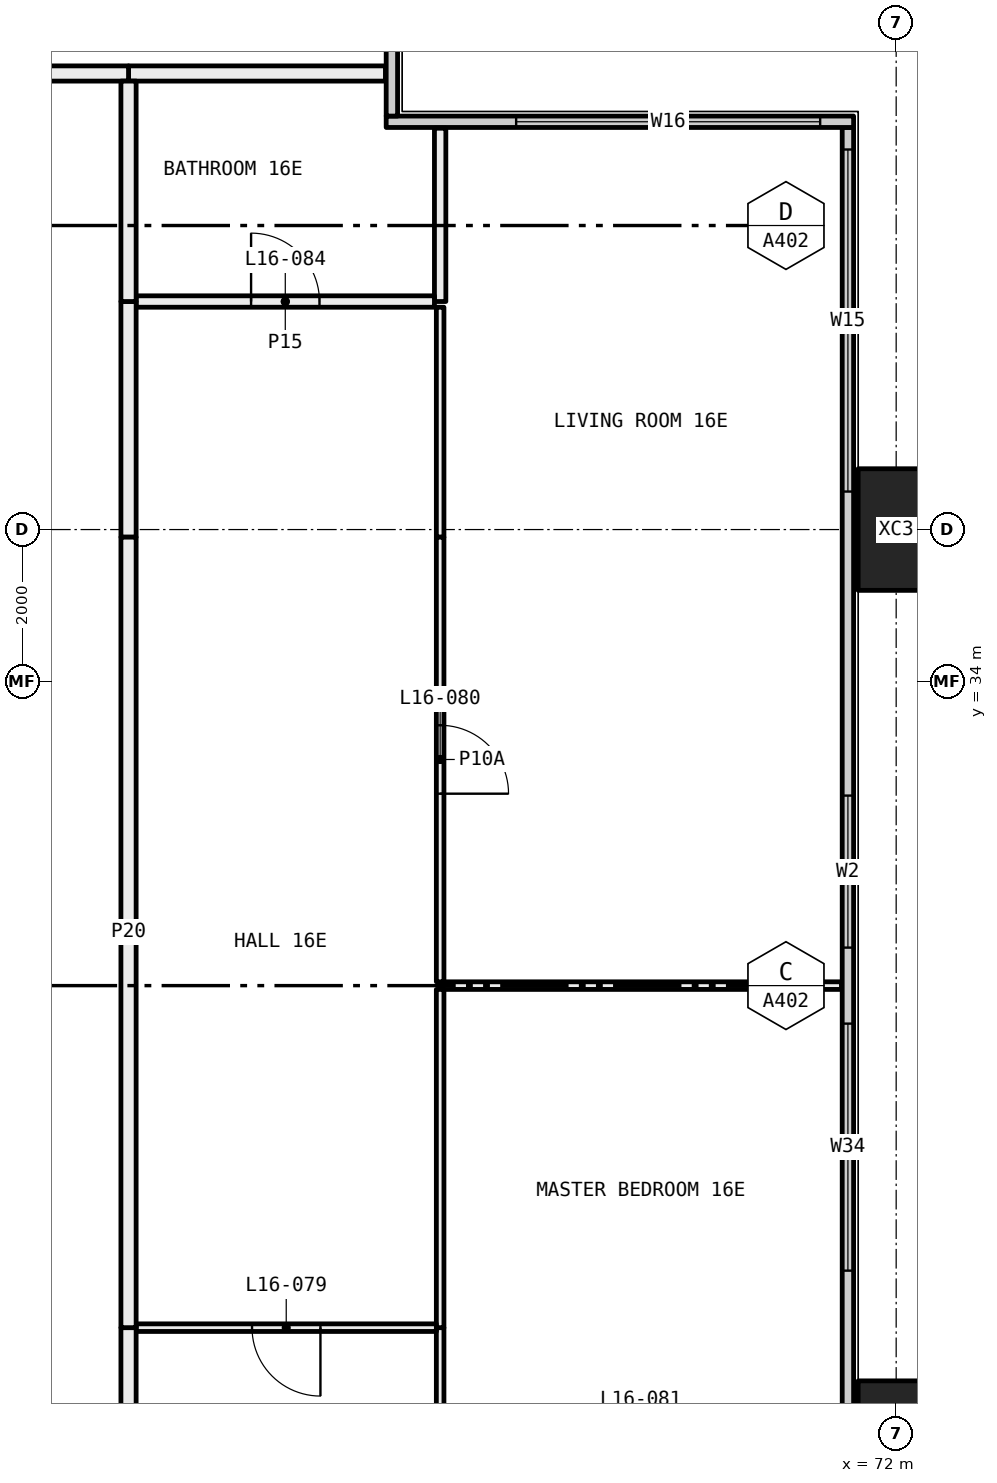
"""IFC4 building model, lengths in metres.
Left out: names, types, materials, properties, quantities, classifications, styles, units other than length and angle.
Written with IfcOpenShell. Run it as: python <this file> out.ifc"""

import sys

from ifc_helpers import new_model, si_unit, direction, frame, frame_2d, origin, origin_2d, place, context, subcontext, project, spatial, rectangle, hollow_rectangle, extrude, element, fill, save


model = new_model("IFC4")
c1 = context("Model", 3, precision=1e-05, world=origin(), true_north=direction((0.0, 1.0)))
c2 = subcontext(c1, "Body", "Model", "MODEL_VIEW")
j1 = project(units=[si_unit("LENGTHUNIT", "METRE"), si_unit("PLANEANGLEUNIT", "RADIAN")], contexts=[c1])
p1 = place(None, origin())
s1 = spatial("IfcSite", under=j1, at=p1, CompositionType="ELEMENT")
p2 = place(p1, origin())
s2 = spatial("IfcBuilding", under=s1, at=p2, CompositionType="ELEMENT")
p3 = place(p2, frame((0.0, 0.0, 67.95)))
s3 = spatial("IfcBuildingStorey", under=s2, at=p3, CompositionType="ELEMENT", Elevation=67.95)
for number, where, z_axis, x_axis in (
    (1, (72.0, 24.0, -0.4), (0.0, 0.0, 1.0), (0.0, 1.0, 0.0)),
    (2, (72.0, 36.0, -0.4), (0.0, 0.0, 1.0), (0.0, 1.0, 0.0)),
):
    element("IfcColumn", number, at=place(p3, frame(where, z_axis=z_axis, x_axis=x_axis)), inside=s3, PredefinedType="COLUMN", context=c2, shape_type="SweptSolid", body=[
        extrude(hollow_rectangle(XDim=1.6, YDim=1.0, WallThickness=0.065, at=origin_2d()), origin(), (0.0, 0.0, 1.0), 3.45),
    ])
p4 = place(p3, frame((71.365, 6.71, 0.0), z_axis=(0.0, 0.0, 1.0), x_axis=(0.0, 1.0, 0.0)))
e3 = element("IfcWall", 3, at=p4, inside=s3, PredefinedType="ELEMENTEDWALL", context=c2, shape_type="SweptSolid", body=[
    extrude(rectangle(XDim=34.58, YDim=0.15, at=frame_2d((17.29, 0.0))), origin(), (0.0, 0.0, 1.0), 3.05),
])
p5 = place(p4, frame((0.29, 0.0, 0.45)))
e4 = element("IfcOpeningElement", 4, at=p5, cuts=e3, PredefinedType="OPENING", context=c2, shape_type="SweptSolid", body=[
    extrude(rectangle(XDim=4.5, YDim=2.55, at=frame_2d((2.25, 1.275))), frame((0.0, 0.085, 0.0), z_axis=(0.0, -1.0, 0.0), x_axis=(1.0, 0.0, 0.0)), (0.0, 0.0, 1.0), 0.17),
])
p6 = place(p4, frame((7.54, 0.0, 0.45)))
e5 = element("IfcOpeningElement", 5, at=p6, cuts=e3, PredefinedType="OPENING", context=c2, shape_type="SweptSolid", body=[
    extrude(rectangle(XDim=3.25, YDim=2.55, at=frame_2d((1.625, 1.275))), frame((0.0, 0.085, 0.0), z_axis=(0.0, -1.0, 0.0), x_axis=(1.0, 0.0, 0.0)), (0.0, 0.0, 1.0), 0.17),
])
p7 = place(p4, frame((11.79, 0.0, 0.45)))
e6 = element("IfcOpeningElement", 6, at=p7, cuts=e3, PredefinedType="OPENING", context=c2, shape_type="SweptSolid", body=[
    extrude(rectangle(XDim=3.25, YDim=2.55, at=frame_2d((1.625, 1.275))), frame((0.0, 0.085, 0.0), z_axis=(0.0, -1.0, 0.0), x_axis=(1.0, 0.0, 0.0)), (0.0, 0.0, 1.0), 0.17),
])
p8 = place(p4, frame((19.54, 0.0, 0.45)))
e7 = element("IfcOpeningElement", 7, at=p8, cuts=e3, PredefinedType="OPENING", context=c2, shape_type="SweptSolid", body=[
    extrude(rectangle(XDim=3.25, YDim=2.55, at=frame_2d((1.625, 1.275))), frame((0.0, 0.085, 0.0), z_axis=(0.0, -1.0, 0.0), x_axis=(1.0, 0.0, 0.0)), (0.0, 0.0, 1.0), 0.17),
])
p9 = place(p4, frame((23.79, 0.0, 0.45)))
e8 = element("IfcOpeningElement", 8, at=p9, cuts=e3, PredefinedType="OPENING", context=c2, shape_type="SweptSolid", body=[
    extrude(rectangle(XDim=2.0, YDim=2.55, at=frame_2d((1.0, 1.275))), frame((0.0, 0.085, 0.0), z_axis=(0.0, -1.0, 0.0), x_axis=(1.0, 0.0, 0.0)), (0.0, 0.0, 1.0), 0.17),
])
p10 = place(p4, frame((29.79, 0.0, 0.45)))
e9 = element("IfcOpeningElement", 9, at=p10, cuts=e3, PredefinedType="OPENING", context=c2, shape_type="SweptSolid", body=[
    extrude(rectangle(XDim=4.5, YDim=2.55, at=frame_2d((2.25, 1.275))), frame((0.0, 0.085, 0.0), z_axis=(0.0, -1.0, 0.0), x_axis=(1.0, 0.0, 0.0)), (0.0, 0.0, 1.0), 0.17),
])
p11 = place(p3, frame((65.29, 41.365, 0.0), z_axis=(0.0, 0.0, 1.0), x_axis=(1.0, 0.0, 0.0)))
e10 = element("IfcWall", 10, at=p11, inside=s3, PredefinedType="ELEMENTEDWALL", context=c2, shape_type="SweptSolid", body=[
    extrude(rectangle(XDim=6.15, YDim=0.15, at=frame_2d((3.075, 0.0))), origin(), (0.0, 0.0, 1.0), 3.05),
])
p12 = place(p11, frame((1.71, 0.0, 0.45)))
e11 = element("IfcOpeningElement", 11, at=p12, cuts=e10, PredefinedType="OPENING", context=c2, shape_type="SweptSolid", body=[
    extrude(rectangle(XDim=4.0, YDim=2.55, at=frame_2d((2.0, 1.275))), frame((0.0, 0.085, 0.0), z_axis=(0.0, -1.0, 0.0), x_axis=(1.0, 0.0, 0.0)), (0.0, 0.0, 1.0), 0.17),
])
p13 = place(p3, frame((65.365, 41.44, 0.0), z_axis=(0.0, 0.0, 1.0), x_axis=(0.0, 1.0, 0.0)))
e12 = element("IfcWall", 12, at=p13, inside=s3, PredefinedType="ELEMENTEDWALL", context=c2, shape_type="SweptSolid", body=[
    extrude(rectangle(XDim=5.85, YDim=0.15, at=frame_2d((2.925, 0.0))), origin(), (0.0, 0.0, 1.0), 3.05),
])
p14 = place(p13, frame((1.56, 0.0, 0.45)))
e13 = element("IfcOpeningElement", 13, at=p14, cuts=e12, PredefinedType="OPENING", context=c2, shape_type="SweptSolid", body=[
    extrude(rectangle(XDim=4.0, YDim=2.55, at=frame_2d((2.0, 1.275))), frame((0.0, 0.085, 0.0), z_axis=(0.0, -1.0, 0.0), x_axis=(1.0, 0.0, 0.0)), (0.0, 0.0, 1.0), 0.17),
])
p15 = place(p3, frame((61.9, 42.0, 0.0), z_axis=(0.0, 0.0, 1.0), x_axis=(1.0, 0.0, 0.0)))
e14 = element("IfcWall", 14, at=p15, inside=s3, PredefinedType="PARTITIONING", context=c2, shape_type="SweptSolid", body=[
    extrude(rectangle(XDim=3.38, YDim=0.2, at=frame_2d((1.69, 0.0))), origin(), (0.0, 0.0, 1.0), 3.05),
])
p16 = place(p3, frame((54.0, 42.0, 0.0), z_axis=(0.0, 0.0, 1.0), x_axis=(1.0, 0.0, 0.0)))
e15 = element("IfcWall", 15, at=p16, inside=s3, PredefinedType="PARTITIONING", context=c2, shape_type="SweptSolid", body=[
    extrude(rectangle(XDim=7.9, YDim=0.2, at=frame_2d((3.95, 0.0))), origin(), (0.0, 0.0, 1.0), 3.05),
])
p17 = place(p3, frame((71.28, 30.0, 0.0), z_axis=(0.0, 0.0, 1.0), x_axis=(-1.0, 0.0, 0.0)))
e16 = element("IfcWall", 16, at=p17, inside=s3, PredefinedType="PARTITIONING", context=c2, shape_type="SweptSolid", body=[
    extrude(rectangle(XDim=5.28, YDim=0.1, at=frame_2d((2.64, 0.0))), origin(), (0.0, 0.0, 1.0), 3.05),
])
p18 = place(p3, frame((66.0, 25.5, 0.0), z_axis=(0.0, 0.0, 1.0), x_axis=(0.0, -1.0, 0.0)))
e17 = element("IfcWall", 17, at=p18, inside=s3, PredefinedType="PARTITIONING", context=c2, shape_type="SweptSolid", body=[
    extrude(rectangle(XDim=1.45, YDim=0.1, at=frame_2d((0.725, 0.0))), origin(), (0.0, 0.0, 1.0), 2.45),
])
p19 = place(p3, frame((66.0, 29.95, 0.0), z_axis=(0.0, 0.0, 1.0), x_axis=(0.0, -1.0, 0.0)))
e18 = element("IfcWall", 18, at=p19, inside=s3, PredefinedType="PARTITIONING", context=c2, shape_type="SweptSolid", body=[
    extrude(rectangle(XDim=4.45, YDim=0.1, at=frame_2d((2.225, 0.0))), origin(), (0.0, 0.0, 1.0), 3.05),
])
p20 = place(p3, frame((66.0, 38.925, 0.0), z_axis=(0.0, 0.0, 1.0), x_axis=(0.0, -1.0, 0.0)))
e19 = element("IfcWall", 19, at=p20, inside=s3, PredefinedType="PARTITIONING", context=c2, shape_type="SweptSolid", body=[
    extrude(rectangle(XDim=3.025, YDim=0.1, at=frame_2d((1.513, 0.0))), origin(), (0.0, 0.0, 1.0), 2.45),
])
p21 = place(p3, frame((66.0, 35.9, 0.0), z_axis=(0.0, 0.0, 1.0), x_axis=(0.0, -1.0, 0.0)))
e20 = element("IfcWall", 20, at=p21, inside=s3, PredefinedType="PARTITIONING", context=c2, shape_type="SweptSolid", body=[
    extrude(rectangle(XDim=5.85, YDim=0.1, at=frame_2d((2.925, 0.0))), origin(), (0.0, 0.0, 1.0), 3.05),
])
p22 = place(p21, frame((2.475, 0.0, 0.0)))
e21 = element("IfcOpeningElement", 21, at=p22, cuts=e20, PredefinedType="OPENING", context=c2, shape_type="SweptSolid", body=[
    extrude(rectangle(XDim=0.9, YDim=2.1, at=frame_2d((0.45, 1.05))), frame((0.0, 0.06, 0.0), z_axis=(0.0, -1.0, 0.0), x_axis=(1.0, 0.0, 0.0)), (0.0, 0.0, 1.0), 0.12),
])
p23 = place(p3, frame((66.0, 41.28, 0.0), z_axis=(0.0, 0.0, 1.0), x_axis=(0.0, -1.0, 0.0)))
e22 = element("IfcWall", 22, at=p23, inside=s3, PredefinedType="PARTITIONING", context=c2, shape_type="SweptSolid", body=[
    extrude(rectangle(XDim=2.28, YDim=0.15, at=frame_2d((1.14, 0.0))), origin(), (0.0, 0.0, 1.0), 3.05),
])
p24 = place(p3, frame((65.95, 25.5, 0.0), z_axis=(0.0, 0.0, 1.0), x_axis=(-1.0, 0.0, 0.0)))
e23 = element("IfcWall", 23, at=p24, inside=s3, PredefinedType="PARTITIONING", context=c2, shape_type="SweptSolid", body=[
    extrude(rectangle(XDim=3.95, YDim=0.1, at=frame_2d((1.975, 0.0))), origin(), (0.0, 0.0, 1.0), 3.05),
])
p25 = place(p24, frame((1.525, 0.0, 0.0)))
e24 = element("IfcOpeningElement", 24, at=p25, cuts=e23, PredefinedType="OPENING", context=c2, shape_type="SweptSolid", body=[
    extrude(rectangle(XDim=0.9, YDim=2.1, at=frame_2d((0.45, 1.05))), frame((0.0, 0.06, 0.0), z_axis=(0.0, -1.0, 0.0), x_axis=(1.0, 0.0, 0.0)), (0.0, 0.0, 1.0), 0.12),
])
p26 = place(p3, frame((61.9, 25.5, 0.0), z_axis=(0.0, 0.0, 1.0), x_axis=(0.0, -1.0, 0.0)))
e25 = element("IfcWall", 25, at=p26, inside=s3, PredefinedType="PARTITIONING", context=c2, shape_type="SweptSolid", body=[
    extrude(rectangle(XDim=1.6, YDim=0.2, at=frame_2d((0.8, 0.0))), origin(), (0.0, 0.0, 1.0), 2.45),
])
p27 = place(p3, frame((65.925, 39.0, 0.0), z_axis=(0.0, 0.0, 1.0), x_axis=(-1.0, 0.0, 0.0)))
e26 = element("IfcWall", 26, at=p27, inside=s3, PredefinedType="PARTITIONING", context=c2, shape_type="SweptSolid", body=[
    extrude(rectangle(XDim=3.925, YDim=0.15, at=frame_2d((1.962, 0.0))), origin(), (0.0, 0.0, 1.0), 3.05),
])
p28 = place(p27, frame((1.512, 0.0, 0.0)))
e27 = element("IfcOpeningElement", 27, at=p28, cuts=e26, PredefinedType="OPENING", context=c2, shape_type="SweptSolid", body=[
    extrude(rectangle(XDim=0.9, YDim=2.1, at=frame_2d((0.45, 1.05))), frame((0.0, 0.085, 0.0), z_axis=(0.0, -1.0, 0.0), x_axis=(1.0, 0.0, 0.0)), (0.0, 0.0, 1.0), 0.17),
])
p29 = place(p3, frame((61.9, 39.0, 0.0), z_axis=(0.0, 0.0, 1.0), x_axis=(0.0, -1.0, 0.0)))
e28 = element("IfcWall", 28, at=p29, inside=s3, PredefinedType="PARTITIONING", context=c2, shape_type="SweptSolid", body=[
    extrude(rectangle(XDim=3.1, YDim=0.2, at=frame_2d((1.55, 0.0))), origin(), (0.0, 0.0, 1.0), 2.45),
])
p30 = place(p3, frame((61.9, 35.9, 0.0), z_axis=(0.0, 0.0, 1.0), x_axis=(0.0, -1.0, 0.0)))
e29 = element("IfcWall", 29, at=p30, inside=s3, PredefinedType="PARTITIONING", context=c2, shape_type="SweptSolid", body=[
    extrude(rectangle(XDim=10.4, YDim=0.2, at=frame_2d((5.2, 0.0))), origin(), (0.0, 0.0, 1.0), 3.05),
])
p31 = place(p3, frame((61.9, 41.9, 0.0), z_axis=(0.0, 0.0, 1.0), x_axis=(0.0, -1.0, 0.0)))
e30 = element("IfcWall", 30, at=p31, inside=s3, PredefinedType="PARTITIONING", context=c2, shape_type="SweptSolid", body=[
    extrude(rectangle(XDim=2.9, YDim=0.2, at=frame_2d((1.45, 0.0))), origin(), (0.0, 0.0, 1.0), 3.05),
])
p32 = place(p8, origin())
e31 = element("IfcWindow", 31, at=p32, inside=s3, PartitioningType="SINGLE_PANEL", PredefinedType="WINDOW", context=c2, shape_type="SweptSolid", body=[
    extrude(rectangle(XDim=3.25, YDim=2.55, at=frame_2d((1.625, 1.275))), frame((0.0, 0.03, 0.0), z_axis=(0.0, -1.0, 0.0), x_axis=(1.0, 0.0, 0.0)), (0.0, 0.0, 1.0), 0.06),
])
fill(e7, e31)
p33 = place(p9, origin())
e32 = element("IfcWindow", 32, at=p33, inside=s3, PartitioningType="SINGLE_PANEL", PredefinedType="WINDOW", context=c2, shape_type="SweptSolid", body=[
    extrude(rectangle(XDim=2.0, YDim=2.55, at=frame_2d((1.0, 1.275))), frame((0.0, 0.03, 0.0), z_axis=(0.0, -1.0, 0.0), x_axis=(1.0, 0.0, 0.0)), (0.0, 0.0, 1.0), 0.06),
])
fill(e8, e32)
p34 = place(p10, origin())
e33 = element("IfcWindow", 33, at=p34, inside=s3, PartitioningType="SINGLE_PANEL", PredefinedType="WINDOW", context=c2, shape_type="SweptSolid", body=[
    extrude(rectangle(XDim=4.5, YDim=2.55, at=frame_2d((2.25, 1.275))), frame((0.0, 0.03, 0.0), z_axis=(0.0, -1.0, 0.0), x_axis=(1.0, 0.0, 0.0)), (0.0, 0.0, 1.0), 0.06),
])
fill(e9, e33)
p35 = place(p12, origin())
e34 = element("IfcWindow", 34, at=p35, inside=s3, PartitioningType="SINGLE_PANEL", PredefinedType="WINDOW", context=c2, shape_type="SweptSolid", body=[
    extrude(rectangle(XDim=4.0, YDim=2.55, at=frame_2d((2.0, 1.275))), frame((0.0, 0.03, 0.0), z_axis=(0.0, -1.0, 0.0), x_axis=(1.0, 0.0, 0.0)), (0.0, 0.0, 1.0), 0.06),
])
fill(e11, e34)
p36 = place(p25, origin())
e35 = element("IfcDoor", 35, at=p36, inside=s3, OperationType="SINGLE_SWING_RIGHT", PredefinedType="DOOR", context=c2, shape_type="SweptSolid", body=[
    extrude(rectangle(XDim=0.9, YDim=2.1, at=frame_2d((0.45, 1.05))), frame((0.0, 0.025, 0.0), z_axis=(0.0, -1.0, 0.0), x_axis=(1.0, 0.0, 0.0)), (0.0, 0.0, 1.0), 0.05),
])
fill(e24, e35)
p37 = place(p22, origin())
e36 = element("IfcDoor", 36, at=p37, inside=s3, OperationType="SINGLE_SWING_LEFT", PredefinedType="DOOR", context=c2, shape_type="SweptSolid", body=[
    extrude(rectangle(XDim=0.9, YDim=2.1, at=frame_2d((0.45, 1.05))), frame((0.0, 0.025, 0.0), z_axis=(0.0, -1.0, 0.0), x_axis=(1.0, 0.0, 0.0)), (0.0, 0.0, 1.0), 0.05),
])
fill(e21, e36)
p38 = place(p28, frame((0.9, 0.0, 0.0), x_axis=(-1.0, 0.0, 0.0)))
e37 = element("IfcDoor", 37, at=p38, inside=s3, OperationType="SINGLE_SWING_RIGHT", PredefinedType="DOOR", context=c2, shape_type="SweptSolid", body=[
    extrude(rectangle(XDim=0.9, YDim=2.1, at=frame_2d((0.45, 1.05))), frame((0.0, 0.025, 0.0), z_axis=(0.0, -1.0, 0.0), x_axis=(1.0, 0.0, 0.0)), (0.0, 0.0, 1.0), 0.05),
])
fill(e27, e37)
save(model, sys.argv[1])
